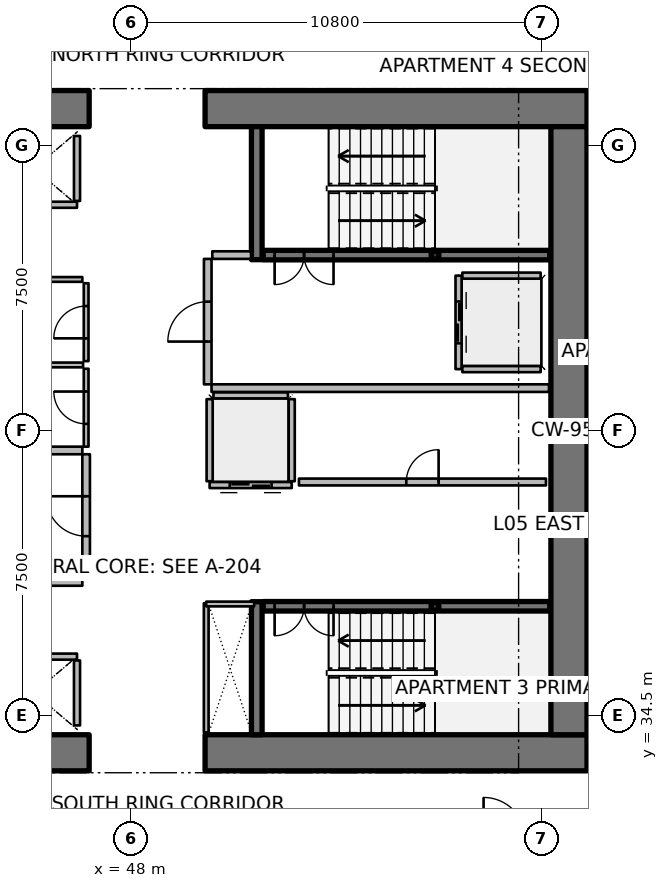
"""IFC4 building model, lengths in metres.
Left out: names, types, materials, properties, quantities, classifications, styles, units other than length and angle.
Written with IfcOpenShell. Run it as: python <this file> out.ifc"""

import sys

from ifc_helpers import new_model, si_unit, direction, frame, frame_2d, origin, origin_2d, place, context, subcontext, project, spatial, rectangle, hollow_rectangle, extrude, element, fill, save


model = new_model("IFC4")
c1 = context("Model", 3, precision=1e-05, world=origin(), true_north=direction((0.0, 1.0)))
c2 = subcontext(c1, "Body", "Model", "MODEL_VIEW")
j1 = project(units=[si_unit("LENGTHUNIT", "METRE"), si_unit("PLANEANGLEUNIT", "RADIAN")], contexts=[c1])
p1 = place(None, origin())
s1 = spatial("IfcSite", under=j1, at=p1, CompositionType="ELEMENT")
p2 = place(p1, origin())
s2 = spatial("IfcBuilding", under=s1, at=p2, CompositionType="ELEMENT")
p3 = place(p2, frame((0.0, 0.0, 26.4)))
s3 = spatial("IfcBuildingStorey", under=s2, at=p3, CompositionType="ELEMENT", Elevation=26.4)
p4 = place(p3, frame((36.85, 33.525, 0.0), z_axis=(0.0, 0.0, 1.0), x_axis=(1.0, 0.0, 0.0)))
e1 = element("IfcWall", 1, at=p4, inside=s3, PredefinedType="SHEAR", context=c2, shape_type="SweptSolid", body=[
    extrude(rectangle(XDim=10.05, YDim=0.95, at=frame_2d((5.025, 0.0))), origin(), (0.0, 0.0, 1.0), 3.75),
])
p5 = place(p3, frame((49.95, 33.525, 0.0), z_axis=(0.0, 0.0, 1.0), x_axis=(1.0, 0.0, 0.0)))
e2 = element("IfcWall", 2, at=p5, inside=s3, PredefinedType="SHEAR", context=c2, shape_type="SweptSolid", body=[
    extrude(rectangle(XDim=10.05, YDim=0.95, at=frame_2d((5.025, 0.0))), origin(), (0.0, 0.0, 1.0), 3.75),
])
p6 = place(p3, frame((36.85, 50.475, 0.0), z_axis=(0.0, 0.0, 1.0), x_axis=(1.0, 0.0, 0.0)))
e3 = element("IfcWall", 3, at=p6, inside=s3, PredefinedType="SHEAR", context=c2, shape_type="SweptSolid", body=[
    extrude(rectangle(XDim=10.05, YDim=0.95, at=frame_2d((5.025, 0.0))), origin(), (0.0, 0.0, 1.0), 3.75),
])
p7 = place(p3, frame((49.95, 50.475, 0.0), z_axis=(0.0, 0.0, 1.0), x_axis=(1.0, 0.0, 0.0)))
e4 = element("IfcWall", 4, at=p7, inside=s3, PredefinedType="SHEAR", context=c2, shape_type="SweptSolid", body=[
    extrude(rectangle(XDim=10.05, YDim=0.95, at=frame_2d((5.025, 0.0))), origin(), (0.0, 0.0, 1.0), 3.75),
])
p8 = place(p3, frame((59.525, 34.0, 0.0), z_axis=(0.0, 0.0, 1.0), x_axis=(0.0, 1.0, 0.0)))
e5 = element("IfcWall", 5, at=p8, inside=s3, PredefinedType="SHEAR", context=c2, shape_type="SweptSolid", body=[
    extrude(rectangle(XDim=16.0, YDim=0.95, at=frame_2d((8.0, 0.0))), origin(), (0.0, 0.0, 1.0), 3.75),
])
for number, where, z_axis, x_axis in (
    (6, (51.31, 46.5, 0.0), (0.0, 0.0, 1.0), (0.0, 1.0, 0.0)),
    (7, (51.31, 34.0, 0.0), (0.0, 0.0, 1.0), (0.0, 1.0, 0.0)),
):
    element("IfcWall", number, at=place(p3, frame(where, z_axis=z_axis, x_axis=x_axis)), inside=s3, PredefinedType="SHEAR", context=c2, shape_type="SweptSolid", body=[
        extrude(rectangle(XDim=3.5, YDim=0.28, at=frame_2d((1.75, 0.0))), origin(), (0.0, 0.0, 1.0), 3.75),
    ])
for number, where, z_axis, x_axis in (
    (8, (56.0, 46.62, 0.0), (0.0, 0.0, 1.0), (1.0, 0.0, 0.0)),
    (9, (56.0, 37.38, 0.0), (0.0, 0.0, 1.0), (1.0, 0.0, 0.0)),
):
    element("IfcColumn", number, at=place(p3, frame(where, z_axis=z_axis, x_axis=x_axis)), inside=s3, PredefinedType="COLUMN", context=c2, shape_type="SweptSolid", body=[
        extrude(hollow_rectangle(XDim=0.2, YDim=0.2, WallThickness=0.01, InnerFilletRadius=0.01, OuterFilletRadius=0.02, at=origin_2d()), origin(), (0.0, 0.0, 1.0), 1.67),
    ])
p9 = place(p3, frame((51.48, 46.62, 0.0), z_axis=(0.0, 0.0, 1.0), x_axis=(1.0, 0.0, 0.0)))
e10 = element("IfcWall", 10, at=p9, inside=s3, PredefinedType="SOLIDWALL", context=c2, shape_type="SweptSolid", body=[
    extrude(rectangle(XDim=7.54, YDim=0.25, at=frame_2d((3.77, 0.0))), origin(), (0.0, 0.0, 1.0), 3.5),
])
p10 = place(p9, frame((0.3, 0.0, 0.0)))
e11 = element("IfcOpeningElement", 11, at=p10, cuts=e10, PredefinedType="OPENING", context=c2, shape_type="SweptSolid", body=[
    extrude(rectangle(XDim=1.55, YDim=2.15, at=frame_2d((0.775, 1.075))), frame((0.0, 0.135, 0.0), z_axis=(0.0, -1.0, 0.0), x_axis=(1.0, 0.0, 0.0)), (0.0, 0.0, 1.0), 0.27),
])
p11 = place(p3, frame((51.48, 37.38, 0.0), z_axis=(0.0, 0.0, 1.0), x_axis=(1.0, 0.0, 0.0)))
e12 = element("IfcWall", 12, at=p11, inside=s3, PredefinedType="SOLIDWALL", context=c2, shape_type="SweptSolid", body=[
    extrude(rectangle(XDim=7.54, YDim=0.25, at=frame_2d((3.77, 0.0))), origin(), (0.0, 0.0, 1.0), 3.5),
])
p12 = place(p11, frame((0.3, 0.0, 0.0)))
e13 = element("IfcOpeningElement", 13, at=p12, cuts=e12, PredefinedType="OPENING", context=c2, shape_type="SweptSolid", body=[
    extrude(rectangle(XDim=1.55, YDim=2.15, at=frame_2d((0.775, 1.075))), frame((0.0, 0.135, 0.0), z_axis=(0.0, -1.0, 0.0), x_axis=(1.0, 0.0, 0.0)), (0.0, 0.0, 1.0), 0.27),
])
p13 = place(p3, frame((46.58, 47.945, 0.0), z_axis=(0.0, 0.0, 1.0), x_axis=(-1.0, 0.0, 0.0)))
e14 = element("IfcWall", 14, at=p13, inside=s3, PredefinedType="PARTITIONING", context=c2, shape_type="SweptSolid", body=[
    extrude(rectangle(XDim=2.26, YDim=0.16, at=frame_2d((1.13, 0.0))), origin(), (0.0, 0.0, 1.0), 3.5),
])
p14 = place(p3, frame((46.58, 48.045, 0.0), z_axis=(0.0, 0.0, 1.0), x_axis=(0.0, 1.0, 0.0)))
e15 = element("IfcWall", 15, at=p14, inside=s3, PredefinedType="PARTITIONING", context=c2, shape_type="SweptSolid", body=[
    extrude(rectangle(XDim=1.71, YDim=0.16, at=frame_2d((0.855, 0.0))), origin(), (0.0, 0.0, 1.0), 3.5),
])
p15 = place(p3, frame((44.32, 36.055, 0.0), z_axis=(0.0, 0.0, 1.0), x_axis=(1.0, 0.0, 0.0)))
e16 = element("IfcWall", 16, at=p15, inside=s3, PredefinedType="PARTITIONING", context=c2, shape_type="SweptSolid", body=[
    extrude(rectangle(XDim=2.26, YDim=0.16, at=frame_2d((1.13, 0.0))), origin(), (0.0, 0.0, 1.0), 3.5),
])
p16 = place(p3, frame((46.58, 34.245, 0.0), z_axis=(0.0, 0.0, 1.0), x_axis=(0.0, 1.0, 0.0)))
e17 = element("IfcWall", 17, at=p16, inside=s3, PredefinedType="PARTITIONING", context=c2, shape_type="SweptSolid", body=[
    extrude(rectangle(XDim=1.71, YDim=0.16, at=frame_2d((0.855, 0.0))), origin(), (0.0, 0.0, 1.0), 3.5),
])
p17 = place(p3, frame((56.62, 46.08, 0.0), z_axis=(0.0, 0.0, 1.0), x_axis=(0.0, -1.0, 0.0)))
e18 = element("IfcWall", 18, at=p17, inside=s3, PredefinedType="PARTITIONING", context=c2, shape_type="SweptSolid", body=[
    extrude(rectangle(XDim=2.46, YDim=0.16, at=frame_2d((1.23, 0.0))), origin(), (0.0, 0.0, 1.0), 3.5),
])
p18 = place(p17, frame((0.68, 0.0, 0.0)))
e19 = element("IfcOpeningElement", 19, at=p18, cuts=e18, PredefinedType="OPENING", context=c2, shape_type="SweptSolid", body=[
    extrude(rectangle(XDim=1.1, YDim=2.1, at=frame_2d((0.55, 1.05))), frame((0.0, 0.09, 0.0), z_axis=(0.0, -1.0, 0.0), x_axis=(1.0, 0.0, 0.0)), (0.0, 0.0, 1.0), 0.18),
])
for number, where, z_axis, x_axis in (
    (20, (56.72, 46.08, 0.0), (0.0, 0.0, 1.0), (1.0, 0.0, 0.0)),
    (21, (56.72, 43.62, 0.0), (0.0, 0.0, 1.0), (1.0, 0.0, 0.0)),
):
    element("IfcWall", number, at=place(p3, frame(where, z_axis=z_axis, x_axis=x_axis)), inside=s3, PredefinedType="PARTITIONING", context=c2, shape_type="SweptSolid", body=[
        extrude(rectangle(XDim=2.06, YDim=0.16, at=frame_2d((1.03, 0.0))), origin(), (0.0, 0.0, 1.0), 3.5),
    ])
p19 = place(p3, frame((52.23, 40.57, 0.0), z_axis=(0.0, 0.0, 1.0), x_axis=(-1.0, 0.0, 0.0)))
e22 = element("IfcWall", 22, at=p19, inside=s3, PredefinedType="PARTITIONING", context=c2, shape_type="SweptSolid", body=[
    extrude(rectangle(XDim=2.16, YDim=0.16, at=frame_2d((1.08, 0.0))), origin(), (0.0, 0.0, 1.0), 3.5),
])
p20 = place(p19, frame((0.53, 0.0, 0.0)))
e23 = element("IfcOpeningElement", 23, at=p20, cuts=e22, PredefinedType="OPENING", context=c2, shape_type="SweptSolid", body=[
    extrude(rectangle(XDim=1.1, YDim=2.1, at=frame_2d((0.55, 1.05))), frame((0.0, 0.09, 0.0), z_axis=(0.0, -1.0, 0.0), x_axis=(1.0, 0.0, 0.0)), (0.0, 0.0, 1.0), 0.18),
])
for number, where, z_axis, x_axis in (
    (24, (52.23, 40.67, 0.0), (0.0, 0.0, 1.0), (0.0, 1.0, 0.0)),
    (25, (50.07, 40.67, 0.0), (0.0, 0.0, 1.0), (0.0, 1.0, 0.0)),
):
    element("IfcWall", number, at=place(p3, frame(where, z_axis=z_axis, x_axis=x_axis)), inside=s3, PredefinedType="PARTITIONING", context=c2, shape_type="SweptSolid", body=[
        extrude(rectangle(XDim=2.16, YDim=0.16, at=frame_2d((1.08, 0.0))), origin(), (0.0, 0.0, 1.0), 3.5),
    ])
p21 = place(p3, frame((50.17, 42.93, 0.0), z_axis=(0.0, 0.0, 1.0), x_axis=(1.0, 0.0, 0.0)))
e26 = element("IfcWall", 26, at=p21, inside=s3, PredefinedType="PARTITIONING", context=c2, shape_type="SweptSolid", body=[
    extrude(rectangle(XDim=1.96, YDim=0.16, at=frame_2d((0.98, 0.0))), origin(), (0.0, 0.0, 1.0), 3.5),
])
p22 = place(p3, frame((52.42, 40.65, 0.0), z_axis=(0.0, 0.0, 1.0), x_axis=(1.0, 0.0, 0.0)))
e27 = element("IfcWall", 27, at=p22, inside=s3, PredefinedType="PARTITIONING", context=c2, shape_type="SweptSolid", body=[
    extrude(rectangle(XDim=6.5, YDim=0.18, at=frame_2d((3.25, 0.0))), origin(), (0.0, 0.0, 1.0), 3.5),
])
p23 = place(p22, frame((2.825, 0.0, 0.0)))
e28 = element("IfcOpeningElement", 28, at=p23, cuts=e27, PredefinedType="OPENING", context=c2, shape_type="SweptSolid", body=[
    extrude(rectangle(XDim=0.85, YDim=2.06, at=frame_2d((0.425, 1.03))), frame((0.0, 0.1, 0.0), z_axis=(0.0, -1.0, 0.0), x_axis=(1.0, 0.0, 0.0)), (0.0, 0.0, 1.0), 0.2),
])
p24 = place(p3, frame((41.35, 38.02, 0.0), z_axis=(0.0, 0.0, 1.0), x_axis=(1.0, 0.0, 0.0)))
e29 = element("IfcWall", 29, at=p24, inside=s3, PredefinedType="PARTITIONING", context=c2, shape_type="SweptSolid", body=[
    extrude(rectangle(XDim=5.37, YDim=0.2, at=frame_2d((2.685, 0.0))), origin(), (0.0, 0.0, 1.0), 3.5),
])
p25 = place(p3, frame((43.92, 41.48, 0.0), z_axis=(0.0, 0.0, 1.0), x_axis=(1.0, 0.0, 0.0)))
e30 = element("IfcWall", 30, at=p25, inside=s3, PredefinedType="PARTITIONING", context=c2, shape_type="SweptSolid", body=[
    extrude(rectangle(XDim=2.8, YDim=0.2, at=frame_2d((1.4, 0.0))), origin(), (0.0, 0.0, 1.0), 3.5),
])
p26 = place(p3, frame((46.82, 38.12, 0.0), z_axis=(0.0, 0.0, 1.0), x_axis=(0.0, 1.0, 0.0)))
e31 = element("IfcWall", 31, at=p26, inside=s3, PredefinedType="PARTITIONING", context=c2, shape_type="SweptSolid", body=[
    extrude(rectangle(XDim=3.26, YDim=0.2, at=frame_2d((1.63, 0.0))), origin(), (0.0, 0.0, 1.0), 3.5),
])
p27 = place(p26, frame((1.105, 0.0, 0.0)))
e32 = element("IfcOpeningElement", 32, at=p27, cuts=e31, PredefinedType="OPENING", context=c2, shape_type="SweptSolid", body=[
    extrude(rectangle(XDim=1.05, YDim=2.1, at=frame_2d((0.525, 1.05))), frame((0.0, 0.11, 0.0), z_axis=(0.0, -1.0, 0.0), x_axis=(1.0, 0.0, 0.0)), (0.0, 0.0, 1.0), 0.22),
])
p28 = place(p3, frame((50.12, 43.12, 0.0), z_axis=(0.0, 0.0, 1.0), x_axis=(1.0, 0.0, 0.0)))
e33 = element("IfcWall", 33, at=p28, inside=s3, PredefinedType="PARTITIONING", context=c2, shape_type="SweptSolid", body=[
    extrude(rectangle(XDim=8.88, YDim=0.2, at=frame_2d((4.44, 0.0))), origin(), (0.0, 0.0, 1.0), 3.5),
])
p29 = place(p3, frame((50.14, 46.62, 0.0), z_axis=(0.0, 0.0, 1.0), x_axis=(1.0, 0.0, 0.0)))
e34 = element("IfcWall", 34, at=p29, inside=s3, PredefinedType="PARTITIONING", context=c2, shape_type="SweptSolid", body=[
    extrude(rectangle(XDim=1.02, YDim=0.2, at=frame_2d((0.51, 0.0))), origin(), (0.0, 0.0, 1.0), 3.5),
])
p30 = place(p3, frame((50.02, 43.22, 0.0), z_axis=(0.0, 0.0, 1.0), x_axis=(0.0, 1.0, 0.0)))
e35 = element("IfcWall", 35, at=p30, inside=s3, PredefinedType="PARTITIONING", context=c2, shape_type="SweptSolid", body=[
    extrude(rectangle(XDim=3.3, YDim=0.2, at=frame_2d((1.65, 0.0))), origin(), (0.0, 0.0, 1.0), 3.5),
])
p31 = place(p30, frame((1.125, 0.0, 0.0)))
e36 = element("IfcOpeningElement", 36, at=p31, cuts=e35, PredefinedType="OPENING", context=c2, shape_type="SweptSolid", body=[
    extrude(rectangle(XDim=1.05, YDim=2.1, at=frame_2d((0.525, 1.05))), frame((0.0, 0.11, 0.0), z_axis=(0.0, -1.0, 0.0), x_axis=(1.0, 0.0, 0.0)), (0.0, 0.0, 1.0), 0.22),
])
p32 = place(p3, frame((41.36, 45.98, 0.0), z_axis=(0.0, 0.0, 1.0), x_axis=(1.0, 0.0, 0.0)))
e37 = element("IfcWall", 37, at=p32, inside=s3, PredefinedType="PARTITIONING", context=c2, shape_type="SweptSolid", body=[
    extrude(rectangle(XDim=5.36, YDim=0.125, at=frame_2d((2.68, 0.0))), origin(), (0.0, 0.0, 1.0), 2.94),
])
p33 = place(p3, frame((49.98, 34.06, 0.0), z_axis=(0.0, 0.0, 1.0), x_axis=(0.0, 1.0, 0.0)))
e38 = element("IfcWall", 38, at=p33, inside=s3, PredefinedType="PARTITIONING", context=c2, shape_type="SweptSolid", body=[
    extrude(rectangle(XDim=3.4, YDim=0.125, at=frame_2d((1.7, 0.0))), origin(), (0.0, 0.0, 1.0), 2.94),
])
p34 = place(p3, frame((49.98, 37.44, 0.0), z_axis=(0.0, 0.0, 1.0), x_axis=(1.0, 0.0, 0.0)))
e39 = element("IfcWall", 39, at=p34, inside=s3, PredefinedType="PARTITIONING", context=c2, shape_type="SweptSolid", body=[
    extrude(rectangle(XDim=1.26, YDim=0.125, at=frame_2d((0.63, 0.0))), origin(), (0.0, 0.0, 1.0), 2.94),
])
p35 = place(p3, frame((44.03, 43.73, 0.0), z_axis=(0.0, 0.0, 1.0), x_axis=(1.0, 0.0, 0.0)))
e40 = element("IfcWall", 40, at=p35, inside=s3, PredefinedType="PARTITIONING", context=c2, shape_type="SweptSolid", body=[
    extrude(rectangle(XDim=2.71, YDim=0.125, at=frame_2d((1.355, 0.0))), origin(), (0.0, 0.0, 1.0), 2.94),
])
p36 = place(p3, frame((46.82, 41.58, 0.0), z_axis=(0.0, 0.0, 1.0), x_axis=(0.0, 1.0, 0.0)))
e41 = element("IfcWall", 41, at=p36, inside=s3, PredefinedType="PARTITIONING", context=c2, shape_type="SweptSolid", body=[
    extrude(rectangle(XDim=2.05, YDim=0.125, at=frame_2d((1.025, 0.0))), origin(), (0.0, 0.0, 1.0), 2.94),
])
p37 = place(p36, frame((0.6, 0.0, 0.0)))
e42 = element("IfcOpeningElement", 42, at=p37, cuts=e41, PredefinedType="OPENING", context=c2, shape_type="SweptSolid", body=[
    extrude(rectangle(XDim=0.85, YDim=2.06, at=frame_2d((0.425, 1.03))), frame((0.0, 0.073, 0.0), z_axis=(0.0, -1.0, 0.0), x_axis=(1.0, 0.0, 0.0)), (0.0, 0.0, 1.0), 0.145),
])
p38 = place(p3, frame((46.82, 43.83, 0.0), z_axis=(0.0, 0.0, 1.0), x_axis=(0.0, 1.0, 0.0)))
e43 = element("IfcWall", 43, at=p38, inside=s3, PredefinedType="PARTITIONING", context=c2, shape_type="SweptSolid", body=[
    extrude(rectangle(XDim=2.05, YDim=0.125, at=frame_2d((1.025, 0.0))), origin(), (0.0, 0.0, 1.0), 2.94),
])
p39 = place(p38, frame((0.6, 0.0, 0.0)))
e44 = element("IfcOpeningElement", 44, at=p39, cuts=e43, PredefinedType="OPENING", context=c2, shape_type="SweptSolid", body=[
    extrude(rectangle(XDim=0.85, YDim=2.06, at=frame_2d((0.425, 1.03))), frame((0.0, 0.073, 0.0), z_axis=(0.0, -1.0, 0.0), x_axis=(1.0, 0.0, 0.0)), (0.0, 0.0, 1.0), 0.145),
])
p40 = place(p10, origin())
e45 = element("IfcDoor", 45, at=p40, inside=s3, OperationType="DOUBLE_DOOR_SINGLE_SWING", PredefinedType="DOOR", context=c2, shape_type="SweptSolid", body=[
    extrude(rectangle(XDim=1.55, YDim=2.15, at=frame_2d((0.775, 1.075))), frame((0.0, 0.025, 0.0), z_axis=(0.0, -1.0, 0.0), x_axis=(1.0, 0.0, 0.0)), (0.0, 0.0, 1.0), 0.05),
])
fill(e11, e45)
p41 = place(p12, origin())
e46 = element("IfcDoor", 46, at=p41, inside=s3, OperationType="DOUBLE_DOOR_SINGLE_SWING", PredefinedType="DOOR", context=c2, shape_type="SweptSolid", body=[
    extrude(rectangle(XDim=1.55, YDim=2.15, at=frame_2d((0.775, 1.075))), frame((0.0, 0.025, 0.0), z_axis=(0.0, -1.0, 0.0), x_axis=(1.0, 0.0, 0.0)), (0.0, 0.0, 1.0), 0.05),
])
fill(e13, e46)
p42 = place(p18, origin())
e47 = element("IfcDoor", 47, at=p42, inside=s3, OperationType="DOUBLE_DOOR_SLIDING", PredefinedType="DOOR", context=c2, shape_type="SweptSolid", body=[
    extrude(rectangle(XDim=1.1, YDim=2.1, at=frame_2d((0.55, 1.05))), frame((0.0, 0.025, 0.0), z_axis=(0.0, -1.0, 0.0), x_axis=(1.0, 0.0, 0.0)), (0.0, 0.0, 1.0), 0.05),
])
fill(e19, e47)
p43 = place(p20, origin())
e48 = element("IfcDoor", 48, at=p43, inside=s3, OperationType="DOUBLE_DOOR_SLIDING", PredefinedType="DOOR", context=c2, shape_type="SweptSolid", body=[
    extrude(rectangle(XDim=1.1, YDim=2.1, at=frame_2d((0.55, 1.05))), frame((0.0, 0.025, 0.0), z_axis=(0.0, -1.0, 0.0), x_axis=(1.0, 0.0, 0.0)), (0.0, 0.0, 1.0), 0.05),
])
fill(e23, e48)
p44 = place(p23, origin())
e49 = element("IfcDoor", 49, at=p44, inside=s3, OperationType="SINGLE_SWING_RIGHT", PredefinedType="DOOR", context=c2, shape_type="SweptSolid", body=[
    extrude(rectangle(XDim=0.85, YDim=2.06, at=frame_2d((0.425, 1.03))), frame((0.0, 0.025, 0.0), z_axis=(0.0, -1.0, 0.0), x_axis=(1.0, 0.0, 0.0)), (0.0, 0.0, 1.0), 0.05),
])
fill(e28, e49)
p45 = place(p27, origin())
e50 = element("IfcDoor", 50, at=p45, inside=s3, OperationType="SINGLE_SWING_RIGHT", PredefinedType="DOOR", context=c2, shape_type="SweptSolid", body=[
    extrude(rectangle(XDim=1.05, YDim=2.1, at=frame_2d((0.525, 1.05))), frame((0.0, 0.025, 0.0), z_axis=(0.0, -1.0, 0.0), x_axis=(1.0, 0.0, 0.0)), (0.0, 0.0, 1.0), 0.05),
])
fill(e32, e50)
p46 = place(p31, origin())
e51 = element("IfcDoor", 51, at=p46, inside=s3, OperationType="SINGLE_SWING_LEFT", PredefinedType="DOOR", context=c2, shape_type="SweptSolid", body=[
    extrude(rectangle(XDim=1.05, YDim=2.1, at=frame_2d((0.525, 1.05))), frame((0.0, 0.025, 0.0), z_axis=(0.0, -1.0, 0.0), x_axis=(1.0, 0.0, 0.0)), (0.0, 0.0, 1.0), 0.05),
])
fill(e36, e51)
p47 = place(p37, origin())
e52 = element("IfcDoor", 52, at=p47, inside=s3, OperationType="SINGLE_SWING_RIGHT", PredefinedType="DOOR", context=c2, shape_type="SweptSolid", body=[
    extrude(rectangle(XDim=0.85, YDim=2.06, at=frame_2d((0.425, 1.03))), frame((0.0, 0.025, 0.0), z_axis=(0.0, -1.0, 0.0), x_axis=(1.0, 0.0, 0.0)), (0.0, 0.0, 1.0), 0.05),
])
fill(e42, e52)
p48 = place(p39, origin())
e53 = element("IfcDoor", 53, at=p48, inside=s3, OperationType="SINGLE_SWING_LEFT", PredefinedType="DOOR", context=c2, shape_type="SweptSolid", body=[
    extrude(rectangle(XDim=0.85, YDim=2.06, at=frame_2d((0.425, 1.03))), frame((0.0, 0.025, 0.0), z_axis=(0.0, -1.0, 0.0), x_axis=(1.0, 0.0, 0.0)), (0.0, 0.0, 1.0), 0.05),
])
fill(e44, e53)
save(model, sys.argv[1])
